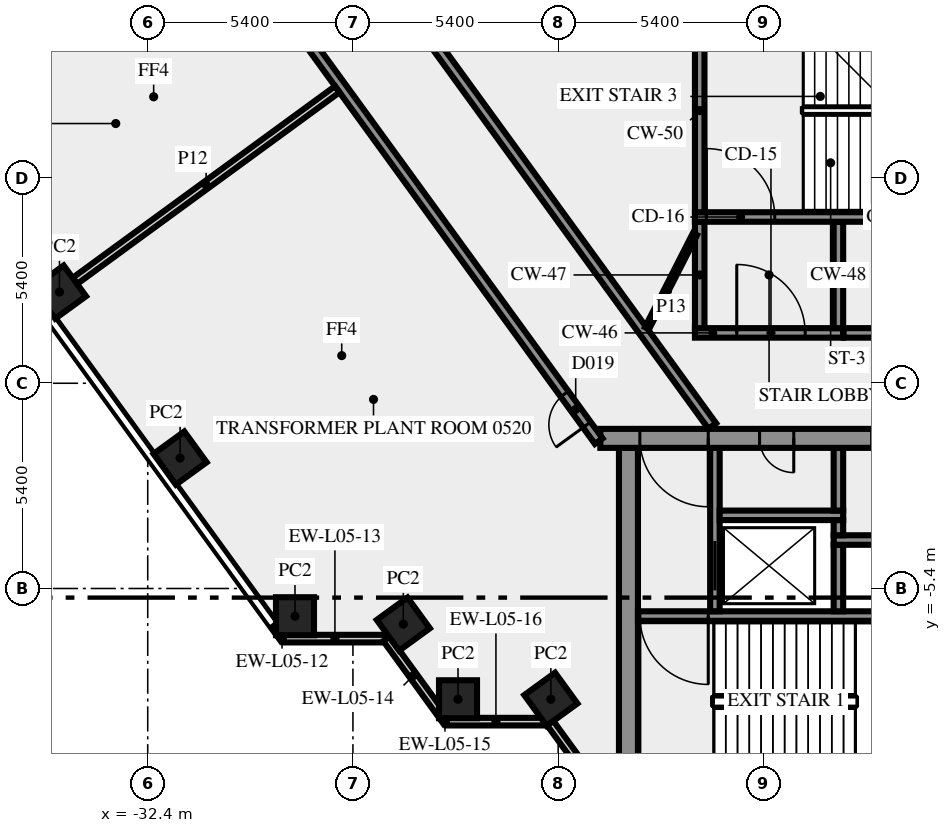
"""IFC4 building model, lengths in metres.
Left out: names, types, materials, properties, quantities, classifications, styles, units other than length and angle.
Written with IfcOpenShell. Run it as: python <this file> out.ifc"""

import sys

from ifc_helpers import new_model, si_unit, direction, frame, frame_2d, origin, origin_2d, place, context, subcontext, project, spatial, rectangle, extrude, element, fill, save


model = new_model("IFC4")
c1 = context("Model", 3, precision=1e-05, world=origin(), true_north=direction((0.0, 1.0)))
c2 = subcontext(c1, "Body", "Model", "MODEL_VIEW")
j1 = project(units=[si_unit("LENGTHUNIT", "METRE"), si_unit("PLANEANGLEUNIT", "RADIAN")], contexts=[c1])
p1 = place(None, origin())
s1 = spatial("IfcSite", under=j1, at=p1, CompositionType="ELEMENT")
p2 = place(p1, origin())
s2 = spatial("IfcBuilding", under=s1, at=p2, CompositionType="ELEMENT")
p3 = place(p2, frame((0.0, 0.0, 25.0)))
s3 = spatial("IfcBuildingStorey", under=s2, at=p3, CompositionType="ELEMENT", Elevation=25.0)
for number, where, z_axis, x_axis in (
    (1, (-34.722, 2.4, 0.0), (0.0, 0.0, 1.0), (0.588, -0.809, 0.0)),
    (2, (-31.548, -1.969, 0.0), (0.0, 0.0, 1.0), (0.588, -0.809, 0.0)),
    (3, (-28.525, -6.13, 0.0), (0.0, 0.0, 1.0), (1.0, 0.0, 0.0)),
    (4, (-25.674, -6.337, 0.0), (0.0, 0.0, 1.0), (0.588, -0.809, 0.0)),
    (5, (-24.235, -8.315, 0.0), (0.0, 0.0, 1.0), (1.0, 0.0, 0.0)),
    (6, (-21.792, -8.315, 0.0), (0.0, 0.0, 1.0), (0.588, -0.809, 0.0)),
):
    element("IfcColumn", number, at=place(p3, frame(where, z_axis=z_axis, x_axis=x_axis)), inside=s3, PredefinedType="COLUMN", context=c2, shape_type="SweptSolid", body=[
        extrude(rectangle(XDim=1.0, YDim=1.0, at=origin_2d()), origin(), (0.0, 0.0, 1.0), 5.65),
    ])
p4 = place(p3, frame((-55.244, 29.646, 0.0), z_axis=(0.0, 0.0, 1.0), x_axis=(0.587784449244, -0.809017577823, 0.0)))
e7 = element("IfcWall", 7, at=p4, inside=s3, PredefinedType="SOLIDWALL", context=c2, shape_type="SweptSolid", body=[
    extrude(rectangle(XDim=44.654, YDim=0.2, at=frame_2d((22.327, 0.0))), origin(), (0.0, 0.0, 1.0), 5.65),
])
p5 = place(p3, frame((-28.911, -6.599, 0.0), z_axis=(0.0, 0.0, 1.0), x_axis=(0.588358759446, -0.808600006297, 0.0)))
e8 = element("IfcWall", 8, at=p5, inside=s3, PredefinedType="SOLIDWALL", context=c2, shape_type="SweptSolid", body=[
    extrude(rectangle(XDim=0.155, YDim=0.2, at=frame_2d((0.078, 0.0))), origin(), (0.0, 0.0, 1.0), 5.65),
])
p6 = place(p3, frame((-28.818, -6.719, 0.0), z_axis=(0.0, 0.0, 1.0), x_axis=(1.0, 0.0, 0.0)))
e9 = element("IfcWall", 9, at=p6, inside=s3, PredefinedType="SOLIDWALL", context=c2, shape_type="SweptSolid", body=[
    extrude(rectangle(XDim=2.688, YDim=0.2, at=frame_2d((1.344, 0.0))), origin(), (0.0, 0.0, 1.0), 5.65),
])
p7 = place(p3, frame((-26.12, -6.724, 0.0), z_axis=(0.0, 0.0, 1.0), x_axis=(0.587706476352, -0.809074222587, 0.0)))
e10 = element("IfcWall", 10, at=p7, inside=s3, PredefinedType="SOLIDWALL", context=c2, shape_type="SweptSolid", body=[
    extrude(rectangle(XDim=2.403, YDim=0.2, at=frame_2d((1.202, 0.0))), origin(), (0.0, 0.0, 1.0), 5.65),
])
p8 = place(p3, frame((-24.624, -8.784, 0.0), z_axis=(0.0, 0.0, 1.0), x_axis=(0.586760218966, -0.809760733451, 0.0)))
e11 = element("IfcWall", 11, at=p8, inside=s3, PredefinedType="SOLIDWALL", context=c2, shape_type="SweptSolid", body=[
    extrude(rectangle(XDim=0.154, YDim=0.2, at=frame_2d((0.077, 0.0))), origin(), (0.0, 0.0, 1.0), 5.65),
])
p9 = place(p3, frame((-24.531, -8.904, 0.0), z_axis=(0.0, 0.0, 1.0), x_axis=(1.0, 0.0, 0.0)))
e12 = element("IfcWall", 12, at=p9, inside=s3, PredefinedType="SOLIDWALL", context=c2, shape_type="SweptSolid", body=[
    extrude(rectangle(XDim=2.587, YDim=0.2, at=frame_2d((1.294, 0.0))), origin(), (0.0, 0.0, 1.0), 5.65),
])
p10 = place(p3, frame((-21.833, -8.909, 0.0), z_axis=(0.0, 0.0, 1.0), x_axis=(0.587766567315, -0.809030569476, 0.0)))
e13 = element("IfcWall", 13, at=p10, inside=s3, PredefinedType="SOLIDWALL", context=c2, shape_type="SweptSolid", body=[
    extrude(rectangle(XDim=2.688, YDim=0.2, at=frame_2d((1.344, 0.0))), origin(), (0.0, 0.0, 1.0), 5.65),
])
p11 = place(p3, frame((-19.75, -10.5, 0.0), z_axis=(0.0, 0.0, 1.0), x_axis=(0.0, 1.0, 0.0)))
e14 = element("IfcWall", 14, at=p11, inside=s3, PredefinedType="SHEAR", context=c2, shape_type="SweptSolid", body=[
    extrude(rectangle(XDim=8.8, YDim=0.5, at=frame_2d((4.4, 0.0))), origin(), (0.0, 0.0, 1.0), 5.65),
])
p12 = place(p3, frame((-11.45, -6.125, 0.0), z_axis=(0.0, 0.0, 1.0), x_axis=(-1.0, 0.0, 0.0)))
e15 = element("IfcWall", 15, at=p12, inside=s3, PredefinedType="SHEAR", context=c2, shape_type="SweptSolid", body=[
    extrude(rectangle(XDim=8.05, YDim=0.25, at=frame_2d((4.025, 0.0))), origin(), (0.0, 0.0, 1.0), 5.65),
])
p13 = place(p12, frame((6.2, 0.0, 0.0)))
e16 = element("IfcOpeningElement", 16, at=p13, cuts=e15, PredefinedType="OPENING", context=c2, shape_type="SweptSolid", body=[
    extrude(rectangle(XDim=1.8, YDim=2.1, at=frame_2d((0.9, 1.05))), frame((0.0, 0.135, 0.0), z_axis=(0.0, -1.0, 0.0), x_axis=(1.0, 0.0, 0.0)), (0.0, 0.0, 1.0), 0.27),
])
p14 = place(p3, frame((-17.475, -6.0, 0.0), z_axis=(0.0, 0.0, 1.0), x_axis=(0.0, 1.0, 0.0)))
e17 = element("IfcWall", 17, at=p14, inside=s3, PredefinedType="SHEAR", context=c2, shape_type="SweptSolid", body=[
    extrude(rectangle(XDim=4.3, YDim=0.25, at=frame_2d((2.15, 0.0))), origin(), (0.0, 0.0, 1.0), 5.65),
])
p15 = place(p14, frame((0.55, 0.0, 0.0)))
e18 = element("IfcOpeningElement", 18, at=p15, cuts=e17, PredefinedType="OPENING", context=c2, shape_type="SweptSolid", body=[
    extrude(rectangle(XDim=1.3, YDim=2.1, at=frame_2d((0.65, 1.05))), frame((0.0, 0.135, 0.0), z_axis=(0.0, -1.0, 0.0), x_axis=(1.0, 0.0, 0.0)), (0.0, 0.0, 1.0), 0.27),
])
p16 = place(p3, frame((-14.225, -6.0, 0.0), z_axis=(0.0, 0.0, 1.0), x_axis=(0.0, 1.0, 0.0)))
e19 = element("IfcWall", 19, at=p16, inside=s3, PredefinedType="SHEAR", context=c2, shape_type="SweptSolid", body=[
    extrude(rectangle(XDim=1.75, YDim=0.25, at=frame_2d((0.875, 0.0))), origin(), (0.0, 0.0, 1.0), 5.65),
])
p17 = place(p3, frame((-14.35, -4.125, 0.0), z_axis=(0.0, 0.0, 1.0), x_axis=(1.0, 0.0, 0.0)))
e20 = element("IfcWall", 20, at=p17, inside=s3, PredefinedType="SHEAR", context=c2, shape_type="SweptSolid", body=[
    extrude(rectangle(XDim=12.7, YDim=0.25, at=frame_2d((6.35, 0.0))), origin(), (0.0, 0.0, 1.0), 5.65),
])
p18 = place(p3, frame((-14.225, -4.0, 0.0), z_axis=(0.0, 0.0, 1.0), x_axis=(0.0, 1.0, 0.0)))
e21 = element("IfcWall", 21, at=p18, inside=s3, PredefinedType="SHEAR", context=c2, shape_type="SweptSolid", body=[
    extrude(rectangle(XDim=0.4, YDim=0.25, at=frame_2d((0.2, 0.0))), origin(), (0.0, 0.0, 1.0), 5.65),
])
p19 = place(p3, frame((-17.35, -3.475, 0.0), z_axis=(0.0, 0.0, 1.0), x_axis=(1.0, 0.0, 0.0)))
e22 = element("IfcWall", 22, at=p19, inside=s3, PredefinedType="SHEAR", context=c2, shape_type="SweptSolid", body=[
    extrude(rectangle(XDim=3.25, YDim=0.25, at=frame_2d((1.625, 0.0))), origin(), (0.0, 0.0, 1.0), 5.65),
])
p20 = place(p3, frame((-14.225, -3.35, 0.0), z_axis=(0.0, 0.0, 1.0), x_axis=(0.0, 1.0, 0.0)))
e23 = element("IfcWall", 23, at=p20, inside=s3, PredefinedType="SHEAR", context=c2, shape_type="SweptSolid", body=[
    extrude(rectangle(XDim=1.65, YDim=0.25, at=frame_2d((0.825, 0.0))), origin(), (0.0, 0.0, 1.0), 5.65),
])
p21 = place(p3, frame((20.49, -1.45, 0.0), z_axis=(0.0, 0.0, 1.0), x_axis=(-1.0, 0.0, 0.0)))
e24 = element("IfcWall", 24, at=p21, inside=s3, PredefinedType="SHEAR", context=c2, shape_type="SweptSolid", body=[
    extrude(rectangle(XDim=40.98, YDim=0.5, at=frame_2d((20.49, 0.0))), origin(), (0.0, 0.0, 1.0), 5.65),
])
p22 = place(p21, frame((38.14, 0.0, 0.0)))
e25 = element("IfcOpeningElement", 25, at=p22, cuts=e24, PredefinedType="OPENING", context=c2, shape_type="SweptSolid", body=[
    extrude(rectangle(XDim=1.8, YDim=2.1, at=frame_2d((0.9, 1.05))), frame((0.0, 0.26, 0.0), z_axis=(0.0, -1.0, 0.0), x_axis=(1.0, 0.0, 0.0)), (0.0, 0.0, 1.0), 0.52),
])
p23 = place(p21, frame((35.89, 0.0, 0.0)))
e26 = element("IfcOpeningElement", 26, at=p23, cuts=e24, PredefinedType="OPENING", context=c2, shape_type="SweptSolid", body=[
    extrude(rectangle(XDim=0.9, YDim=2.1, at=frame_2d((0.45, 1.05))), frame((0.0, 0.26, 0.0), z_axis=(0.0, -1.0, 0.0), x_axis=(1.0, 0.0, 0.0)), (0.0, 0.0, 1.0), 0.52),
])
p24 = place(p21, frame((32.94, 0.0, 0.0)))
e27 = element("IfcOpeningElement", 27, at=p24, cuts=e24, PredefinedType="OPENING", context=c2, shape_type="SweptSolid", body=[
    extrude(rectangle(XDim=0.9, YDim=2.1, at=frame_2d((0.45, 1.05))), frame((0.0, 0.26, 0.0), z_axis=(0.0, -1.0, 0.0), x_axis=(1.0, 0.0, 0.0)), (0.0, 0.0, 1.0), 0.52),
])
p25 = place(p21, frame((19.59, 0.0, 0.0)))
e28 = element("IfcOpeningElement", 28, at=p25, cuts=e24, PredefinedType="OPENING", context=c2, shape_type="SweptSolid", body=[
    extrude(rectangle(XDim=2.0, YDim=2.1, at=frame_2d((1.0, 1.05))), frame((0.0, 0.26, 0.0), z_axis=(0.0, -1.0, 0.0), x_axis=(1.0, 0.0, 0.0)), (0.0, 0.0, 1.0), 0.52),
])
p26 = place(p21, frame((7.14, 0.0, 0.0)))
e29 = element("IfcOpeningElement", 29, at=p26, cuts=e24, PredefinedType="OPENING", context=c2, shape_type="SweptSolid", body=[
    extrude(rectangle(XDim=0.9, YDim=2.1, at=frame_2d((0.45, 1.05))), frame((0.0, 0.26, 0.0), z_axis=(0.0, -1.0, 0.0), x_axis=(1.0, 0.0, 0.0)), (0.0, 0.0, 1.0), 0.52),
])
p27 = place(p21, frame((5.028, 0.0, 0.0)))
e30 = element("IfcOpeningElement", 30, at=p27, cuts=e24, PredefinedType="OPENING", context=c2, shape_type="SweptSolid", body=[
    extrude(rectangle(XDim=0.8, YDim=2.1, at=frame_2d((0.4, 1.05))), frame((0.0, 0.26, 0.0), z_axis=(0.0, -1.0, 0.0), x_axis=(1.0, 0.0, 0.0)), (0.0, 0.0, 1.0), 0.52),
])
p28 = place(p21, frame((3.452, 0.0, 0.0)))
e31 = element("IfcOpeningElement", 31, at=p28, cuts=e24, PredefinedType="OPENING", context=c2, shape_type="SweptSolid", body=[
    extrude(rectangle(XDim=0.8, YDim=2.1, at=frame_2d((0.4, 1.05))), frame((0.0, 0.26, 0.0), z_axis=(0.0, -1.0, 0.0), x_axis=(1.0, 0.0, 0.0)), (0.0, 0.0, 1.0), 0.52),
])
p29 = place(p21, frame((1.04, 0.0, 0.0)))
e32 = element("IfcOpeningElement", 32, at=p29, cuts=e24, PredefinedType="OPENING", context=c2, shape_type="SweptSolid", body=[
    extrude(rectangle(XDim=1.8, YDim=2.1, at=frame_2d((0.9, 1.05))), frame((0.0, 0.26, 0.0), z_axis=(0.0, -1.0, 0.0), x_axis=(1.0, 0.0, 0.0)), (0.0, 0.0, 1.0), 0.52),
])
p30 = place(p3, frame((-18.0, 1.325, 0.0), z_axis=(0.0, 0.0, 1.0), x_axis=(1.0, 0.0, 0.0)))
e33 = element("IfcWall", 33, at=p30, inside=s3, PredefinedType="SHEAR", context=c2, shape_type="SweptSolid", body=[
    extrude(rectangle(XDim=3.9, YDim=0.25, at=frame_2d((1.95, 0.0))), origin(), (0.0, 0.0, 1.0), 5.65),
])
p31 = place(p30, frame((1.1, 0.0, 0.0)))
e34 = element("IfcOpeningElement", 34, at=p31, cuts=e33, PredefinedType="OPENING", context=c2, shape_type="SweptSolid", body=[
    extrude(rectangle(XDim=1.8, YDim=2.1, at=frame_2d((0.9, 1.05))), frame((0.0, 0.135, 0.0), z_axis=(0.0, -1.0, 0.0), x_axis=(1.0, 0.0, 0.0)), (0.0, 0.0, 1.0), 0.27),
])
for number, where, z_axis, x_axis in (
    (35, (-17.875, 1.45, 0.0), (0.0, 0.0, 1.0), (0.0, 1.0, 0.0)),
    (36, (-14.225, 1.45, 0.0), (0.0, 0.0, 1.0), (0.0, 1.0, 0.0)),
):
    element("IfcWall", number, at=place(p3, frame(where, z_axis=z_axis, x_axis=x_axis)), inside=s3, PredefinedType="SHEAR", context=c2, shape_type="SweptSolid", body=[
        extrude(rectangle(XDim=2.8, YDim=0.25, at=frame_2d((1.4, 0.0))), origin(), (0.0, 0.0, 1.0), 5.65),
    ])
p32 = place(p3, frame((-18.0, 4.375, 0.0), z_axis=(0.0, 0.0, 1.0), x_axis=(1.0, 0.0, 0.0)))
e37 = element("IfcWall", 37, at=p32, inside=s3, PredefinedType="SHEAR", context=c2, shape_type="SweptSolid", body=[
    extrude(rectangle(XDim=10.5, YDim=0.25, at=frame_2d((5.25, 0.0))), origin(), (0.0, 0.0, 1.0), 5.65),
])
p33 = place(p32, frame((0.3, 0.0, 0.0)))
e38 = element("IfcOpeningElement", 38, at=p33, cuts=e37, PredefinedType="OPENING", context=c2, shape_type="SweptSolid", body=[
    extrude(rectangle(XDim=1.8, YDim=2.1, at=frame_2d((0.9, 1.05))), frame((0.0, 0.135, 0.0), z_axis=(0.0, -1.0, 0.0), x_axis=(1.0, 0.0, 0.0)), (0.0, 0.0, 1.0), 0.27),
])
p34 = place(p3, frame((-17.875, 4.5, 0.0), z_axis=(0.0, 0.0, 1.0), x_axis=(0.0, 1.0, 0.0)))
e39 = element("IfcWall", 39, at=p34, inside=s3, PredefinedType="SHEAR", context=c2, shape_type="SweptSolid", body=[
    extrude(rectangle(XDim=5.35, YDim=0.25, at=frame_2d((2.675, 0.0))), origin(), (0.0, 0.0, 1.0), 5.65),
])
p35 = place(p3, frame((-20.531, -1.523, 0.0), z_axis=(0.0, 0.0, 1.0), x_axis=(-0.587785385475, 0.809016897612, 0.0)))
e40 = element("IfcWall", 40, at=p35, inside=s3, PredefinedType="SOLIDWALL", context=c2, shape_type="SweptSolid", body=[
    extrude(rectangle(XDim=50.212, YDim=0.25, at=frame_2d((25.106, 0.0))), origin(), (0.0, 0.0, 1.0), 5.65),
])
p36 = place(p35, frame((47.87, 0.0, 0.0)))
e41 = element("IfcOpeningElement", 41, at=p36, cuts=e40, PredefinedType="OPENING", context=c2, shape_type="SweptSolid", body=[
    extrude(rectangle(XDim=1.2, YDim=2.1, at=frame_2d((0.6, 1.05))), frame((0.0, 0.135, 0.0), z_axis=(0.0, -1.0, 0.0), x_axis=(1.0, 0.0, 0.0)), (0.0, 0.0, 1.0), 0.27),
])
p37 = place(p35, frame((20.765, 0.0, 0.0)))
e42 = element("IfcOpeningElement", 42, at=p37, cuts=e40, PredefinedType="OPENING", context=c2, shape_type="SweptSolid", body=[
    extrude(rectangle(XDim=1.2, YDim=2.1, at=frame_2d((0.6, 1.05))), frame((0.0, 0.135, 0.0), z_axis=(0.0, -1.0, 0.0), x_axis=(1.0, 0.0, 0.0)), (0.0, 0.0, 1.0), 0.27),
])
p38 = place(p35, frame((15.366, 0.0, 0.0)))
e43 = element("IfcOpeningElement", 43, at=p38, cuts=e40, PredefinedType="OPENING", context=c2, shape_type="SweptSolid", body=[
    extrude(rectangle(XDim=1.2, YDim=2.1, at=frame_2d((0.6, 1.05))), frame((0.0, 0.135, 0.0), z_axis=(0.0, -1.0, 0.0), x_axis=(1.0, 0.0, 0.0)), (0.0, 0.0, 1.0), 0.27),
])
p39 = place(p35, frame((22.667, 0.0, 0.0)))
e44 = element("IfcOpeningElement", 44, at=p39, cuts=e40, PredefinedType="OPENING", context=c2, shape_type="SweptSolid", body=[
    extrude(rectangle(XDim=1.0, YDim=2.1, at=frame_2d((0.5, 1.05))), frame((0.0, 0.135, 0.0), z_axis=(0.0, -1.0, 0.0), x_axis=(1.0, 0.0, 0.0)), (0.0, 0.0, 1.0), 0.27),
])
p40 = place(p35, frame((0.533, 0.0, 0.0)))
e45 = element("IfcOpeningElement", 45, at=p40, cuts=e40, PredefinedType="OPENING", context=c2, shape_type="SweptSolid", body=[
    extrude(rectangle(XDim=1.0, YDim=2.1, at=frame_2d((0.5, 1.05))), frame((0.0, 0.135, 0.0), z_axis=(0.0, -1.0, 0.0), x_axis=(1.0, 0.0, 0.0)), (0.0, 0.0, 1.0), 0.27),
])
p41 = place(p3, frame((-37.232, 25.972, 0.0), z_axis=(0.0, 0.0, 1.0), x_axis=(0.587786323093, -0.809016216391, 0.0)))
e46 = element("IfcWall", 46, at=p41, inside=s3, PredefinedType="SOLIDWALL", context=c2, shape_type="SweptSolid", body=[
    extrude(rectangle(XDim=33.493, YDim=0.25, at=frame_2d((16.747, 0.0))), origin(), (0.0, 0.0, 1.0), 5.65),
])
p42 = place(p41, frame((4.285, 0.0, 0.0)))
e47 = element("IfcOpeningElement", 47, at=p42, cuts=e46, PredefinedType="OPENING", context=c2, shape_type="SweptSolid", body=[
    extrude(rectangle(XDim=1.2, YDim=2.1, at=frame_2d((0.6, 1.05))), frame((0.0, 0.135, 0.0), z_axis=(0.0, -1.0, 0.0), x_axis=(1.0, 0.0, 0.0)), (0.0, 0.0, 1.0), 0.27),
])
p43 = place(p41, frame((0.34, 0.0, 0.0)))
e48 = element("IfcOpeningElement", 48, at=p43, cuts=e46, PredefinedType="OPENING", context=c2, shape_type="SweptSolid", body=[
    extrude(rectangle(XDim=0.9, YDim=2.1, at=frame_2d((0.45, 1.05))), frame((0.0, 0.135, 0.0), z_axis=(0.0, -1.0, 0.0), x_axis=(1.0, 0.0, 0.0)), (0.0, 0.0, 1.0), 0.27),
])
p44 = place(p3, frame((-14.09, 1.325, 0.0), z_axis=(0.0, 0.0, 1.0), x_axis=(1.0, 0.0, 0.0)))
e49 = element("IfcWall", 49, at=p44, inside=s3, PredefinedType="SOLIDWALL", context=c2, shape_type="SweptSolid", body=[
    extrude(rectangle(XDim=28.18, YDim=0.25, at=frame_2d((14.09, 0.0))), origin(), (0.0, 0.0, 1.0), 5.65),
])
p45 = place(p44, frame((9.661, 0.0, 0.0)))
e50 = element("IfcOpeningElement", 50, at=p45, cuts=e49, PredefinedType="OPENING", context=c2, shape_type="SweptSolid", body=[
    extrude(rectangle(XDim=1.2, YDim=2.1, at=frame_2d((0.6, 1.05))), frame((0.0, 0.135, 0.0), z_axis=(0.0, -1.0, 0.0), x_axis=(1.0, 0.0, 0.0)), (0.0, 0.0, 1.0), 0.27),
])
p46 = place(p44, frame((11.561, 0.0, 0.0)))
e51 = element("IfcOpeningElement", 51, at=p46, cuts=e49, PredefinedType="OPENING", context=c2, shape_type="SweptSolid", body=[
    extrude(rectangle(XDim=1.2, YDim=2.1, at=frame_2d((0.6, 1.05))), frame((0.0, 0.135, 0.0), z_axis=(0.0, -1.0, 0.0), x_axis=(1.0, 0.0, 0.0)), (0.0, 0.0, 1.0), 0.27),
])
p47 = place(p44, frame((4.103, 0.0, 0.0)))
e52 = element("IfcOpeningElement", 52, at=p47, cuts=e49, PredefinedType="OPENING", context=c2, shape_type="SweptSolid", body=[
    extrude(rectangle(XDim=1.0, YDim=2.1, at=frame_2d((0.5, 1.05))), frame((0.0, 0.135, 0.0), z_axis=(0.0, -1.0, 0.0), x_axis=(1.0, 0.0, 0.0)), (0.0, 0.0, 1.0), 0.27),
])
p48 = place(p3, frame((-37.487, 7.064, 0.0), z_axis=(0.0, 0.0, 1.0), x_axis=(0.807513605299, 0.589848944441, 0.0)))
e53 = element("IfcWall", 53, at=p48, inside=s3, PredefinedType="SOLIDWALL", context=c2, shape_type="SweptSolid", body=[
    extrude(rectangle(XDim=8.545, YDim=0.2, at=frame_2d((4.272, 0.0))), origin(), (0.0, 0.0, 1.0), 5.65),
])
p49 = place(p3, frame((-34.313, 2.696, 0.0), z_axis=(0.0, 0.0, 1.0), x_axis=(0.80756437274, 0.589779436639, 0.0)))
e54 = element("IfcWall", 54, at=p49, inside=s3, PredefinedType="SOLIDWALL", context=c2, shape_type="SweptSolid", body=[
    extrude(rectangle(XDim=8.544, YDim=0.2, at=frame_2d((4.272, 0.0))), origin(), (0.0, 0.0, 1.0), 5.65),
])
p50 = place(p3, frame((-19.261, 1.45, 0.0), z_axis=(0.0, 0.0, 1.0), x_axis=(0.453950796792, 0.891026752736, 0.0)))
e55 = element("IfcWall", 55, at=p50, inside=s3, PredefinedType="PARTITIONING", context=c2, shape_type="SweptSolid", body=[
    extrude(rectangle(XDim=2.778, YDim=0.12, at=frame_2d((1.389, 0.0))), origin(), (0.0, 0.0, 1.0), 5.65),
])
p51 = place(p13, origin())
e56 = element("IfcDoor", 56, at=p51, inside=s3, OperationType="DOUBLE_DOOR_SINGLE_SWING", PredefinedType="DOOR", context=c2, shape_type="SweptSolid", body=[
    extrude(rectangle(XDim=1.8, YDim=2.1, at=frame_2d((0.9, 1.05))), frame((0.0, 0.025, 0.0), z_axis=(0.0, -1.0, 0.0), x_axis=(1.0, 0.0, 0.0)), (0.0, 0.0, 1.0), 0.05),
])
fill(e16, e56)
p52 = place(p15, origin())
e57 = element("IfcDoor", 57, at=p52, inside=s3, OperationType="DOUBLE_DOOR_SLIDING", PredefinedType="DOOR", context=c2, shape_type="SweptSolid", body=[
    extrude(rectangle(XDim=1.3, YDim=2.1, at=frame_2d((0.65, 1.05))), frame((0.0, 0.025, 0.0), z_axis=(0.0, -1.0, 0.0), x_axis=(1.0, 0.0, 0.0)), (0.0, 0.0, 1.0), 0.05),
])
fill(e18, e57)
p53 = place(p22, origin())
e58 = element("IfcDoor", 58, at=p53, inside=s3, OperationType="DOUBLE_DOOR_SINGLE_SWING", PredefinedType="DOOR", context=c2, shape_type="SweptSolid", body=[
    extrude(rectangle(XDim=1.8, YDim=2.1, at=frame_2d((0.9, 1.05))), frame((0.0, 0.025, 0.0), z_axis=(0.0, -1.0, 0.0), x_axis=(1.0, 0.0, 0.0)), (0.0, 0.0, 1.0), 0.05),
])
fill(e25, e58)
p54 = place(p23, origin())
e59 = element("IfcDoor", 59, at=p54, inside=s3, OperationType="SINGLE_SWING_RIGHT", PredefinedType="DOOR", context=c2, shape_type="SweptSolid", body=[
    extrude(rectangle(XDim=0.9, YDim=2.1, at=frame_2d((0.45, 1.05))), frame((0.0, 0.025, 0.0), z_axis=(0.0, -1.0, 0.0), x_axis=(1.0, 0.0, 0.0)), (0.0, 0.0, 1.0), 0.05),
])
fill(e26, e59)
p55 = place(p31, origin())
e60 = element("IfcDoor", 60, at=p55, inside=s3, OperationType="DOUBLE_DOOR_SINGLE_SWING", PredefinedType="DOOR", context=c2, shape_type="SweptSolid", body=[
    extrude(rectangle(XDim=1.8, YDim=2.1, at=frame_2d((0.9, 1.05))), frame((0.0, 0.025, 0.0), z_axis=(0.0, -1.0, 0.0), x_axis=(1.0, 0.0, 0.0)), (0.0, 0.0, 1.0), 0.05),
])
fill(e34, e60)
p56 = place(p33, origin())
e61 = element("IfcDoor", 61, at=p56, inside=s3, OperationType="DOUBLE_DOOR_SINGLE_SWING", PredefinedType="DOOR", context=c2, shape_type="SweptSolid", body=[
    extrude(rectangle(XDim=1.8, YDim=2.1, at=frame_2d((0.9, 1.05))), frame((0.0, 0.025, 0.0), z_axis=(0.0, -1.0, 0.0), x_axis=(1.0, 0.0, 0.0)), (0.0, 0.0, 1.0), 0.05),
])
fill(e38, e61)
p57 = place(p40, origin())
e62 = element("IfcDoor", 62, at=p57, inside=s3, OperationType="SINGLE_SWING_LEFT", PredefinedType="DOOR", context=c2, shape_type="SweptSolid", body=[
    extrude(rectangle(XDim=1.0, YDim=2.1, at=frame_2d((0.5, 1.05))), frame((0.0, 0.025, 0.0), z_axis=(0.0, -1.0, 0.0), x_axis=(1.0, 0.0, 0.0)), (0.0, 0.0, 1.0), 0.05),
])
fill(e45, e62)
save(model, sys.argv[1])
